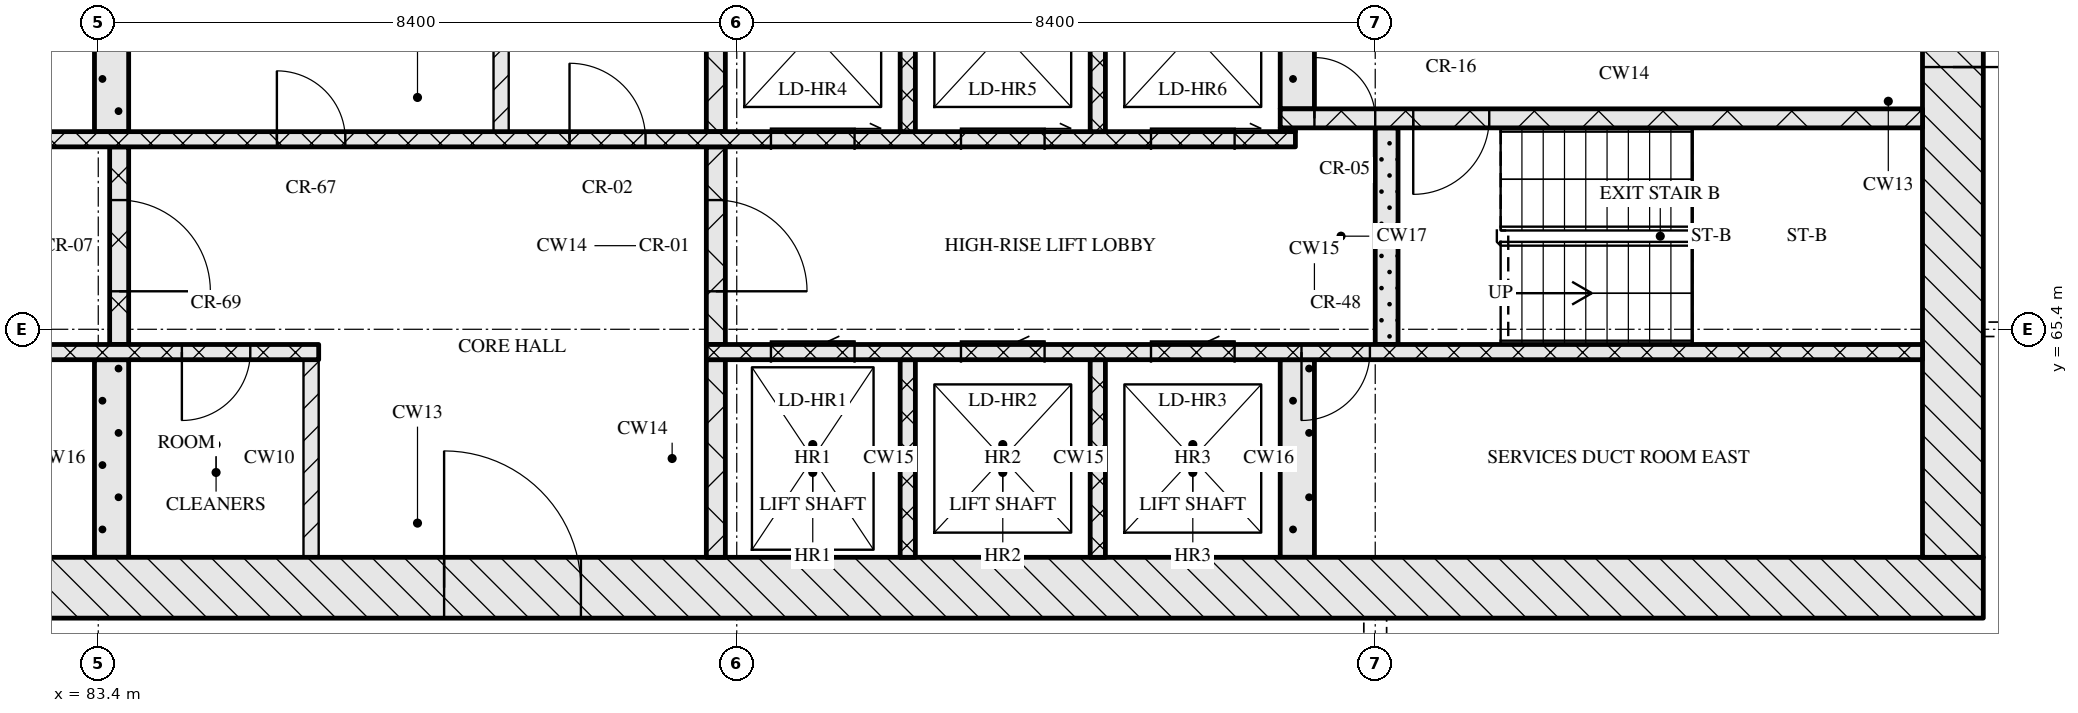
"""IFC4 building model, lengths in metres.
Left out: names, types, materials, properties, quantities, classifications, styles, units other than length and angle.
Written with IfcOpenShell. Run it as: python <this file> out.ifc"""

import sys

from ifc_helpers import new_model, si_unit, direction, frame, frame_2d, origin, place, context, subcontext, project, spatial, rectangle, extrude, element, fill, save


model = new_model("IFC4")
c1 = context("Model", 3, precision=1e-05, world=origin(), true_north=direction((0.0, 1.0)))
c2 = subcontext(c1, "Body", "Model", "MODEL_VIEW")
j1 = project(units=[si_unit("LENGTHUNIT", "METRE"), si_unit("PLANEANGLEUNIT", "RADIAN")], contexts=[c1])
p1 = place(None, origin())
s1 = spatial("IfcSite", under=j1, at=p1, CompositionType="ELEMENT")
p2 = place(p1, origin())
s2 = spatial("IfcBuilding", under=s1, at=p2, CompositionType="ELEMENT")
p3 = place(p2, frame((0.0, 0.0, 165.45)))
s3 = spatial("IfcBuildingStorey", under=s2, at=p3, CompositionType="ELEMENT", Elevation=165.45)
p4 = place(p3, frame((67.0, 62.0, 0.0), z_axis=(0.0, 0.0, 1.0), x_axis=(1.0, 0.0, 0.0)))
e1 = element("IfcWall", 1, at=p4, inside=s3, PredefinedType="SOLIDWALL", context=c2, shape_type="SweptSolid", body=[
    extrude(rectangle(XDim=41.2, YDim=0.8, at=frame_2d((20.6, 0.0))), origin(), (0.0, 0.0, 1.0), 3.32),
])
p5 = place(p4, frame((20.95, 0.0, 0.0)))
e2 = element("IfcOpeningElement", 2, at=p5, cuts=e1, PredefinedType="OPENING", context=c2, shape_type="SweptSolid", body=[
    extrude(rectangle(XDim=1.8, YDim=2.1, at=frame_2d((0.9, 1.05))), frame((0.0, 0.41, 0.0), z_axis=(0.0, -1.0, 0.0), x_axis=(1.0, 0.0, 0.0)), (0.0, 0.0, 1.0), 0.82),
])
p6 = place(p3, frame((107.8, 62.4, 0.0), z_axis=(0.0, 0.0, 1.0), x_axis=(0.0, 1.0, 0.0)))
e3 = element("IfcWall", 3, at=p6, inside=s3, PredefinedType="SOLIDWALL", context=c2, shape_type="SweptSolid", body=[
    extrude(rectangle(XDim=12.0, YDim=0.8, at=frame_2d((6.0, 0.0))), origin(), (0.0, 0.0, 1.0), 3.32),
])
p7 = place(p6, frame((6.45, 0.0, 0.0)))
e4 = element("IfcOpeningElement", 4, at=p7, cuts=e3, PredefinedType="OPENING", context=c2, shape_type="SweptSolid", body=[
    extrude(rectangle(XDim=1.2, YDim=2.1, at=frame_2d((0.6, 1.05))), frame((0.0, 0.41, 0.0), z_axis=(0.0, -1.0, 0.0), x_axis=(1.0, 0.0, 0.0)), (0.0, 0.0, 1.0), 0.82),
])
p8 = place(p3, frame((83.575, 62.4, 0.0), z_axis=(0.0, 0.0, 1.0), x_axis=(0.0, 1.0, 0.0)))
e5 = element("IfcWall", 5, at=p8, inside=s3, PredefinedType="SOLIDWALL", context=c2, shape_type="SweptSolid", body=[
    extrude(rectangle(XDim=2.6, YDim=0.45, at=frame_2d((1.3, 0.0))), origin(), (0.0, 0.0, 1.0), 3.32),
])
p9 = place(p3, frame((86.2, 62.4, 0.0), z_axis=(0.0, 0.0, 1.0), x_axis=(0.0, 1.0, 0.0)))
e6 = element("IfcWall", 6, at=p9, inside=s3, PredefinedType="PARTITIONING", context=c2, shape_type="SweptSolid", body=[
    extrude(rectangle(XDim=2.6, YDim=0.2, at=frame_2d((1.3, 0.0))), origin(), (0.0, 0.0, 1.0), 3.32),
])
p10 = place(p3, frame((91.525, 62.4, 0.0), z_axis=(0.0, 0.0, 1.0), x_axis=(0.0, 1.0, 0.0)))
e7 = element("IfcWall", 7, at=p10, inside=s3, PredefinedType="SOLIDWALL", context=c2, shape_type="SweptSolid", body=[
    extrude(rectangle(XDim=2.6, YDim=0.25, at=frame_2d((1.3, 0.0))), origin(), (0.0, 0.0, 1.0), 3.32),
])
for number, where, z_axis, x_axis in (
    (8, (94.05, 62.4, 0.0), (0.0, 0.0, 1.0), (0.0, 1.0, 0.0)),
    (9, (96.55, 62.4, 0.0), (0.0, 0.0, 1.0), (0.0, 1.0, 0.0)),
):
    element("IfcWall", number, at=place(p3, frame(where, z_axis=z_axis, x_axis=x_axis)), inside=s3, PredefinedType="SOLIDWALL", context=c2, shape_type="SweptSolid", body=[
        extrude(rectangle(XDim=2.6, YDim=0.2, at=frame_2d((1.3, 0.0))), origin(), (0.0, 0.0, 1.0), 3.32),
    ])
p11 = place(p3, frame((99.175, 62.4, 0.0), z_axis=(0.0, 0.0, 1.0), x_axis=(0.0, 1.0, 0.0)))
e10 = element("IfcWall", 10, at=p11, inside=s3, PredefinedType="SOLIDWALL", context=c2, shape_type="SweptSolid", body=[
    extrude(rectangle(XDim=2.6, YDim=0.45, at=frame_2d((1.3, 0.0))), origin(), (0.0, 0.0, 1.0), 3.32),
])
p12 = place(p3, frame((67.8, 65.1, 0.0), z_axis=(0.0, 0.0, 1.0), x_axis=(1.0, 0.0, 0.0)))
e11 = element("IfcWall", 11, at=p12, inside=s3, PredefinedType="SOLIDWALL", context=c2, shape_type="SweptSolid", body=[
    extrude(rectangle(XDim=18.5, YDim=0.2, at=frame_2d((9.25, 0.0))), origin(), (0.0, 0.0, 1.0), 3.32),
])
p13 = place(p12, frame((7.27, 0.0, 0.0)))
e12 = element("IfcOpeningElement", 12, at=p13, cuts=e11, PredefinedType="OPENING", context=c2, shape_type="SweptSolid", body=[
    extrude(rectangle(XDim=0.9, YDim=2.1, at=frame_2d((0.45, 1.05))), frame((0.0, 0.11, 0.0), z_axis=(0.0, -1.0, 0.0), x_axis=(1.0, 0.0, 0.0)), (0.0, 0.0, 1.0), 0.22),
])
p14 = place(p12, frame((10.1, 0.0, 0.0)))
e13 = element("IfcOpeningElement", 13, at=p14, cuts=e11, PredefinedType="OPENING", context=c2, shape_type="SweptSolid", body=[
    extrude(rectangle(XDim=0.9, YDim=2.1, at=frame_2d((0.45, 1.05))), frame((0.0, 0.11, 0.0), z_axis=(0.0, -1.0, 0.0), x_axis=(1.0, 0.0, 0.0)), (0.0, 0.0, 1.0), 0.22),
])
p15 = place(p12, frame((13.81, 0.0, 0.0)))
e14 = element("IfcOpeningElement", 14, at=p15, cuts=e11, PredefinedType="OPENING", context=c2, shape_type="SweptSolid", body=[
    extrude(rectangle(XDim=0.9, YDim=2.1, at=frame_2d((0.45, 1.05))), frame((0.0, 0.11, 0.0), z_axis=(0.0, -1.0, 0.0), x_axis=(1.0, 0.0, 0.0)), (0.0, 0.0, 1.0), 0.22),
])
p16 = place(p12, frame((16.7, 0.0, 0.0)))
e15 = element("IfcOpeningElement", 15, at=p16, cuts=e11, PredefinedType="OPENING", context=c2, shape_type="SweptSolid", body=[
    extrude(rectangle(XDim=0.9, YDim=2.1, at=frame_2d((0.45, 1.05))), frame((0.0, 0.11, 0.0), z_axis=(0.0, -1.0, 0.0), x_axis=(1.0, 0.0, 0.0)), (0.0, 0.0, 1.0), 0.22),
])
p17 = place(p3, frame((91.4, 65.1, 0.0), z_axis=(0.0, 0.0, 1.0), x_axis=(1.0, 0.0, 0.0)))
e16 = element("IfcWall", 16, at=p17, inside=s3, PredefinedType="SOLIDWALL", context=c2, shape_type="SweptSolid", body=[
    extrude(rectangle(XDim=16.0, YDim=0.2, at=frame_2d((8.0, 0.0))), origin(), (0.0, 0.0, 1.0), 3.32),
])
p18 = place(p17, frame((0.85, 0.0, 0.0)))
e17 = element("IfcOpeningElement", 17, at=p18, cuts=e16, PredefinedType="OPENING", context=c2, shape_type="SweptSolid", body=[
    extrude(rectangle(XDim=1.1, YDim=2.1, at=frame_2d((0.55, 1.05))), frame((0.0, 0.11, 0.0), z_axis=(0.0, -1.0, 0.0), x_axis=(1.0, 0.0, 0.0)), (0.0, 0.0, 1.0), 0.22),
])
p19 = place(p17, frame((3.35, 0.0, 0.0)))
e18 = element("IfcOpeningElement", 18, at=p19, cuts=e16, PredefinedType="OPENING", context=c2, shape_type="SweptSolid", body=[
    extrude(rectangle(XDim=1.1, YDim=2.1, at=frame_2d((0.55, 1.05))), frame((0.0, 0.11, 0.0), z_axis=(0.0, -1.0, 0.0), x_axis=(1.0, 0.0, 0.0)), (0.0, 0.0, 1.0), 0.22),
])
p20 = place(p17, frame((5.85, 0.0, 0.0)))
e19 = element("IfcOpeningElement", 19, at=p20, cuts=e16, PredefinedType="OPENING", context=c2, shape_type="SweptSolid", body=[
    extrude(rectangle(XDim=1.1, YDim=2.1, at=frame_2d((0.55, 1.05))), frame((0.0, 0.11, 0.0), z_axis=(0.0, -1.0, 0.0), x_axis=(1.0, 0.0, 0.0)), (0.0, 0.0, 1.0), 0.22),
])
p21 = place(p17, frame((7.83, 0.0, 0.0)))
e20 = element("IfcOpeningElement", 20, at=p21, cuts=e16, PredefinedType="OPENING", context=c2, shape_type="SweptSolid", body=[
    extrude(rectangle(XDim=0.9, YDim=2.1, at=frame_2d((0.45, 1.05))), frame((0.0, 0.11, 0.0), z_axis=(0.0, -1.0, 0.0), x_axis=(1.0, 0.0, 0.0)), (0.0, 0.0, 1.0), 0.22),
])
p22 = place(p3, frame((83.675, 65.2, 0.0), z_axis=(0.0, 0.0, 1.0), x_axis=(0.0, 1.0, 0.0)))
e21 = element("IfcWall", 21, at=p22, inside=s3, PredefinedType="SOLIDWALL", context=c2, shape_type="SweptSolid", body=[
    extrude(rectangle(XDim=2.6, YDim=0.25, at=frame_2d((1.3, 0.0))), origin(), (0.0, 0.0, 1.0), 3.32),
])
p23 = place(p22, frame((0.7, 0.0, 0.0)))
e22 = element("IfcOpeningElement", 22, at=p23, cuts=e21, PredefinedType="OPENING", context=c2, shape_type="SweptSolid", body=[
    extrude(rectangle(XDim=1.2, YDim=2.1, at=frame_2d((0.6, 1.05))), frame((0.0, 0.135, 0.0), z_axis=(0.0, -1.0, 0.0), x_axis=(1.0, 0.0, 0.0)), (0.0, 0.0, 1.0), 0.27),
])
p24 = place(p3, frame((91.525, 65.2, 0.0), z_axis=(0.0, 0.0, 1.0), x_axis=(0.0, 1.0, 0.0)))
e23 = element("IfcWall", 23, at=p24, inside=s3, PredefinedType="SOLIDWALL", context=c2, shape_type="SweptSolid", body=[
    extrude(rectangle(XDim=2.6, YDim=0.25, at=frame_2d((1.3, 0.0))), origin(), (0.0, 0.0, 1.0), 3.32),
])
p25 = place(p24, frame((0.7, 0.0, 0.0)))
e24 = element("IfcOpeningElement", 24, at=p25, cuts=e23, PredefinedType="OPENING", context=c2, shape_type="SweptSolid", body=[
    extrude(rectangle(XDim=1.2, YDim=2.1, at=frame_2d((0.6, 1.05))), frame((0.0, 0.135, 0.0), z_axis=(0.0, -1.0, 0.0), x_axis=(1.0, 0.0, 0.0)), (0.0, 0.0, 1.0), 0.27),
])
p26 = place(p3, frame((100.35, 65.2, 0.0), z_axis=(0.0, 0.0, 1.0), x_axis=(0.0, 1.0, 0.0)))
e25 = element("IfcWall", 25, at=p26, inside=s3, PredefinedType="SOLIDWALL", context=c2, shape_type="SweptSolid", body=[
    extrude(rectangle(XDim=2.85, YDim=0.3, at=frame_2d((1.425, 0.0))), origin(), (0.0, 0.0, 1.0), 3.32),
])
p27 = place(p3, frame((76.05, 67.9, 0.0), z_axis=(0.0, 0.0, 1.0), x_axis=(1.0, 0.0, 0.0)))
e26 = element("IfcWall", 26, at=p27, inside=s3, PredefinedType="SOLIDWALL", context=c2, shape_type="SweptSolid", body=[
    extrude(rectangle(XDim=23.1, YDim=0.2, at=frame_2d((11.55, 0.0))), origin(), (0.0, 0.0, 1.0), 3.32),
])
p28 = place(p27, frame((3.2, 0.0, 0.0)))
e27 = element("IfcOpeningElement", 27, at=p28, cuts=e26, PredefinedType="OPENING", context=c2, shape_type="SweptSolid", body=[
    extrude(rectangle(XDim=0.9, YDim=2.1, at=frame_2d((0.45, 1.05))), frame((0.0, 0.11, 0.0), z_axis=(0.0, -1.0, 0.0), x_axis=(1.0, 0.0, 0.0)), (0.0, 0.0, 1.0), 0.22),
])
p29 = place(p27, frame((9.7, 0.0, 0.0)))
e28 = element("IfcOpeningElement", 28, at=p29, cuts=e26, PredefinedType="OPENING", context=c2, shape_type="SweptSolid", body=[
    extrude(rectangle(XDim=0.9, YDim=2.1, at=frame_2d((0.45, 1.05))), frame((0.0, 0.11, 0.0), z_axis=(0.0, -1.0, 0.0), x_axis=(1.0, 0.0, 0.0)), (0.0, 0.0, 1.0), 0.22),
])
p30 = place(p27, frame((13.55, 0.0, 0.0)))
e29 = element("IfcOpeningElement", 29, at=p30, cuts=e26, PredefinedType="OPENING", context=c2, shape_type="SweptSolid", body=[
    extrude(rectangle(XDim=1.0, YDim=2.1, at=frame_2d((0.5, 1.05))), frame((0.0, 0.11, 0.0), z_axis=(0.0, -1.0, 0.0), x_axis=(1.0, 0.0, 0.0)), (0.0, 0.0, 1.0), 0.22),
])
p31 = place(p27, frame((16.2, 0.0, 0.0)))
e30 = element("IfcOpeningElement", 30, at=p31, cuts=e26, PredefinedType="OPENING", context=c2, shape_type="SweptSolid", body=[
    extrude(rectangle(XDim=1.1, YDim=2.1, at=frame_2d((0.55, 1.05))), frame((0.0, 0.11, 0.0), z_axis=(0.0, -1.0, 0.0), x_axis=(1.0, 0.0, 0.0)), (0.0, 0.0, 1.0), 0.22),
])
p32 = place(p27, frame((18.7, 0.0, 0.0)))
e31 = element("IfcOpeningElement", 31, at=p32, cuts=e26, PredefinedType="OPENING", context=c2, shape_type="SweptSolid", body=[
    extrude(rectangle(XDim=1.1, YDim=2.1, at=frame_2d((0.55, 1.05))), frame((0.0, 0.11, 0.0), z_axis=(0.0, -1.0, 0.0), x_axis=(1.0, 0.0, 0.0)), (0.0, 0.0, 1.0), 0.22),
])
p33 = place(p27, frame((21.2, 0.0, 0.0)))
e32 = element("IfcOpeningElement", 32, at=p33, cuts=e26, PredefinedType="OPENING", context=c2, shape_type="SweptSolid", body=[
    extrude(rectangle(XDim=1.1, YDim=2.1, at=frame_2d((0.55, 1.05))), frame((0.0, 0.11, 0.0), z_axis=(0.0, -1.0, 0.0), x_axis=(1.0, 0.0, 0.0)), (0.0, 0.0, 1.0), 0.22),
])
p34 = place(p3, frame((83.575, 68.0, 0.0), z_axis=(0.0, 0.0, 1.0), x_axis=(0.0, 1.0, 0.0)))
e33 = element("IfcWall", 33, at=p34, inside=s3, PredefinedType="SOLIDWALL", context=c2, shape_type="SweptSolid", body=[
    extrude(rectangle(XDim=2.6, YDim=0.45, at=frame_2d((1.3, 0.0))), origin(), (0.0, 0.0, 1.0), 3.32),
])
p35 = place(p3, frame((88.7, 68.0, 0.0), z_axis=(0.0, 0.0, 1.0), x_axis=(0.0, 1.0, 0.0)))
e34 = element("IfcWall", 34, at=p35, inside=s3, PredefinedType="PARTITIONING", context=c2, shape_type="SweptSolid", body=[
    extrude(rectangle(XDim=2.6, YDim=0.2, at=frame_2d((1.3, 0.0))), origin(), (0.0, 0.0, 1.0), 3.32),
])
p36 = place(p3, frame((91.525, 68.0, 0.0), z_axis=(0.0, 0.0, 1.0), x_axis=(0.0, 1.0, 0.0)))
e35 = element("IfcWall", 35, at=p36, inside=s3, PredefinedType="SOLIDWALL", context=c2, shape_type="SweptSolid", body=[
    extrude(rectangle(XDim=2.6, YDim=0.25, at=frame_2d((1.3, 0.0))), origin(), (0.0, 0.0, 1.0), 3.32),
])
for number, where, z_axis, x_axis in (
    (36, (94.05, 68.0, 0.0), (0.0, 0.0, 1.0), (0.0, 1.0, 0.0)),
    (37, (96.55, 68.0, 0.0), (0.0, 0.0, 1.0), (0.0, 1.0, 0.0)),
):
    element("IfcWall", number, at=place(p3, frame(where, z_axis=z_axis, x_axis=x_axis)), inside=s3, PredefinedType="SOLIDWALL", context=c2, shape_type="SweptSolid", body=[
        extrude(rectangle(XDim=2.6, YDim=0.2, at=frame_2d((1.3, 0.0))), origin(), (0.0, 0.0, 1.0), 3.32),
    ])
p37 = place(p3, frame((98.95, 68.025, 0.0), z_axis=(0.0, 0.0, 1.0), x_axis=(1.0, 0.0, 0.0)))
e38 = element("IfcWall", 38, at=p37, inside=s3, PredefinedType="SOLIDWALL", context=c2, shape_type="SweptSolid", body=[
    extrude(rectangle(XDim=0.2, YDim=0.05, at=frame_2d((0.1, 0.0))), origin(), (0.0, 0.0, 1.0), 3.32),
])
p38 = place(p3, frame((98.95, 68.175, 0.0), z_axis=(0.0, 0.0, 1.0), x_axis=(1.0, 0.0, 0.0)))
e39 = element("IfcWall", 39, at=p38, inside=s3, PredefinedType="SOLIDWALL", context=c2, shape_type="SweptSolid", body=[
    extrude(rectangle(XDim=8.45, YDim=0.25, at=frame_2d((4.225, 0.0))), origin(), (0.0, 0.0, 1.0), 3.32),
])
p39 = place(p38, frame((0.45, 0.0, 0.0)))
e40 = element("IfcOpeningElement", 40, at=p39, cuts=e39, PredefinedType="OPENING", context=c2, shape_type="SweptSolid", body=[
    extrude(rectangle(XDim=0.8, YDim=2.1, at=frame_2d((0.4, 1.05))), frame((0.0, 0.135, 0.0), z_axis=(0.0, -1.0, 0.0), x_axis=(1.0, 0.0, 0.0)), (0.0, 0.0, 1.0), 0.27),
])
p40 = place(p38, frame((1.75, 0.0, 0.0)))
e41 = element("IfcOpeningElement", 41, at=p40, cuts=e39, PredefinedType="OPENING", context=c2, shape_type="SweptSolid", body=[
    extrude(rectangle(XDim=1.0, YDim=2.1, at=frame_2d((0.5, 1.05))), frame((0.0, 0.135, 0.0), z_axis=(0.0, -1.0, 0.0), x_axis=(1.0, 0.0, 0.0)), (0.0, 0.0, 1.0), 0.27),
])
p41 = place(p3, frame((99.175, 68.3, 0.0), z_axis=(0.0, 0.0, 1.0), x_axis=(0.0, 1.0, 0.0)))
e42 = element("IfcWall", 42, at=p41, inside=s3, PredefinedType="SOLIDWALL", context=c2, shape_type="SweptSolid", body=[
    extrude(rectangle(XDim=2.3, YDim=0.45, at=frame_2d((1.15, 0.0))), origin(), (0.0, 0.0, 1.0), 3.32),
])
p42 = place(p5, origin())
e43 = element("IfcDoor", 43, at=p42, inside=s3, OperationType="DOUBLE_DOOR_SINGLE_SWING", PredefinedType="DOOR", context=c2, shape_type="SweptSolid", body=[
    extrude(rectangle(XDim=1.8, YDim=2.1, at=frame_2d((0.9, 1.05))), frame((0.0, 0.025, 0.0), z_axis=(0.0, -1.0, 0.0), x_axis=(1.0, 0.0, 0.0)), (0.0, 0.0, 1.0), 0.05),
])
fill(e2, e43)
p43 = place(p16, origin())
e44 = element("IfcDoor", 44, at=p43, inside=s3, OperationType="SINGLE_SWING_RIGHT", PredefinedType="DOOR", context=c2, shape_type="SweptSolid", body=[
    extrude(rectangle(XDim=0.9, YDim=2.1, at=frame_2d((0.45, 1.05))), frame((0.0, 0.025, 0.0), z_axis=(0.0, -1.0, 0.0), x_axis=(1.0, 0.0, 0.0)), (0.0, 0.0, 1.0), 0.05),
])
fill(e15, e44)
p44 = place(p18, origin())
e45 = element("IfcDoor", 45, at=p44, inside=s3, OperationType="SLIDING_TO_LEFT", PredefinedType="DOOR", context=c2, shape_type="SweptSolid", body=[
    extrude(rectangle(XDim=1.1, YDim=2.1, at=frame_2d((0.55, 1.05))), frame((0.0, 0.025, 0.0), z_axis=(0.0, -1.0, 0.0), x_axis=(1.0, 0.0, 0.0)), (0.0, 0.0, 1.0), 0.05),
])
fill(e17, e45)
p45 = place(p19, origin())
e46 = element("IfcDoor", 46, at=p45, inside=s3, OperationType="SLIDING_TO_LEFT", PredefinedType="DOOR", context=c2, shape_type="SweptSolid", body=[
    extrude(rectangle(XDim=1.1, YDim=2.1, at=frame_2d((0.55, 1.05))), frame((0.0, 0.025, 0.0), z_axis=(0.0, -1.0, 0.0), x_axis=(1.0, 0.0, 0.0)), (0.0, 0.0, 1.0), 0.05),
])
fill(e18, e46)
p46 = place(p20, origin())
e47 = element("IfcDoor", 47, at=p46, inside=s3, OperationType="SLIDING_TO_LEFT", PredefinedType="DOOR", context=c2, shape_type="SweptSolid", body=[
    extrude(rectangle(XDim=1.1, YDim=2.1, at=frame_2d((0.55, 1.05))), frame((0.0, 0.025, 0.0), z_axis=(0.0, -1.0, 0.0), x_axis=(1.0, 0.0, 0.0)), (0.0, 0.0, 1.0), 0.05),
])
fill(e19, e47)
p47 = place(p21, origin())
e48 = element("IfcDoor", 48, at=p47, inside=s3, OperationType="SINGLE_SWING_RIGHT", PredefinedType="DOOR", context=c2, shape_type="SweptSolid", body=[
    extrude(rectangle(XDim=0.9, YDim=2.1, at=frame_2d((0.45, 1.05))), frame((0.0, 0.025, 0.0), z_axis=(0.0, -1.0, 0.0), x_axis=(1.0, 0.0, 0.0)), (0.0, 0.0, 1.0), 0.05),
])
fill(e20, e48)
p48 = place(p23, origin())
e49 = element("IfcDoor", 49, at=p48, inside=s3, OperationType="SINGLE_SWING_RIGHT", PredefinedType="DOOR", context=c2, shape_type="SweptSolid", body=[
    extrude(rectangle(XDim=1.2, YDim=2.1, at=frame_2d((0.6, 1.05))), frame((0.0, 0.025, 0.0), z_axis=(0.0, -1.0, 0.0), x_axis=(1.0, 0.0, 0.0)), (0.0, 0.0, 1.0), 0.05),
])
fill(e22, e49)
p49 = place(p25, origin())
e50 = element("IfcDoor", 50, at=p49, inside=s3, OperationType="SINGLE_SWING_RIGHT", PredefinedType="DOOR", context=c2, shape_type="SweptSolid", body=[
    extrude(rectangle(XDim=1.2, YDim=2.1, at=frame_2d((0.6, 1.05))), frame((0.0, 0.025, 0.0), z_axis=(0.0, -1.0, 0.0), x_axis=(1.0, 0.0, 0.0)), (0.0, 0.0, 1.0), 0.05),
])
fill(e24, e50)
p50 = place(p29, origin())
e51 = element("IfcDoor", 51, at=p50, inside=s3, OperationType="SINGLE_SWING_LEFT", PredefinedType="DOOR", context=c2, shape_type="SweptSolid", body=[
    extrude(rectangle(XDim=0.9, YDim=2.1, at=frame_2d((0.45, 1.05))), frame((0.0, 0.025, 0.0), z_axis=(0.0, -1.0, 0.0), x_axis=(1.0, 0.0, 0.0)), (0.0, 0.0, 1.0), 0.05),
])
fill(e28, e51)
p51 = place(p30, origin())
e52 = element("IfcDoor", 52, at=p51, inside=s3, OperationType="SINGLE_SWING_LEFT", PredefinedType="DOOR", context=c2, shape_type="SweptSolid", body=[
    extrude(rectangle(XDim=1.0, YDim=2.1, at=frame_2d((0.5, 1.05))), frame((0.0, 0.025, 0.0), z_axis=(0.0, -1.0, 0.0), x_axis=(1.0, 0.0, 0.0)), (0.0, 0.0, 1.0), 0.05),
])
fill(e29, e52)
p52 = place(p31, origin())
e53 = element("IfcDoor", 53, at=p52, inside=s3, OperationType="SLIDING_TO_RIGHT", PredefinedType="DOOR", context=c2, shape_type="SweptSolid", body=[
    extrude(rectangle(XDim=1.1, YDim=2.1, at=frame_2d((0.55, 1.05))), frame((0.0, 0.025, 0.0), z_axis=(0.0, -1.0, 0.0), x_axis=(1.0, 0.0, 0.0)), (0.0, 0.0, 1.0), 0.05),
])
fill(e30, e53)
p53 = place(p32, origin())
e54 = element("IfcDoor", 54, at=p53, inside=s3, OperationType="SLIDING_TO_RIGHT", PredefinedType="DOOR", context=c2, shape_type="SweptSolid", body=[
    extrude(rectangle(XDim=1.1, YDim=2.1, at=frame_2d((0.55, 1.05))), frame((0.0, 0.025, 0.0), z_axis=(0.0, -1.0, 0.0), x_axis=(1.0, 0.0, 0.0)), (0.0, 0.0, 1.0), 0.05),
])
fill(e31, e54)
p54 = place(p33, origin())
e55 = element("IfcDoor", 55, at=p54, inside=s3, OperationType="SLIDING_TO_RIGHT", PredefinedType="DOOR", context=c2, shape_type="SweptSolid", body=[
    extrude(rectangle(XDim=1.1, YDim=2.1, at=frame_2d((0.55, 1.05))), frame((0.0, 0.025, 0.0), z_axis=(0.0, -1.0, 0.0), x_axis=(1.0, 0.0, 0.0)), (0.0, 0.0, 1.0), 0.05),
])
fill(e32, e55)
p55 = place(p39, origin())
e56 = element("IfcDoor", 56, at=p55, inside=s3, OperationType="SINGLE_SWING_LEFT", PredefinedType="DOOR", context=c2, shape_type="SweptSolid", body=[
    extrude(rectangle(XDim=0.8, YDim=2.1, at=frame_2d((0.4, 1.05))), frame((0.0, 0.025, 0.0), z_axis=(0.0, -1.0, 0.0), x_axis=(1.0, 0.0, 0.0)), (0.0, 0.0, 1.0), 0.05),
])
fill(e40, e56)
p56 = place(p40, origin())
e57 = element("IfcDoor", 57, at=p56, inside=s3, OperationType="SINGLE_SWING_RIGHT", PredefinedType="DOOR", context=c2, shape_type="SweptSolid", body=[
    extrude(rectangle(XDim=1.0, YDim=2.1, at=frame_2d((0.5, 1.05))), frame((0.0, 0.025, 0.0), z_axis=(0.0, -1.0, 0.0), x_axis=(1.0, 0.0, 0.0)), (0.0, 0.0, 1.0), 0.05),
])
fill(e41, e57)
p57 = place(p7, origin())
e58 = element("IfcDoor", 58, at=p57, inside=s3, OperationType="SINGLE_SWING_RIGHT", PredefinedType="DOOR", context=c2, shape_type="SweptSolid", body=[
    extrude(rectangle(XDim=1.2, YDim=2.1, at=frame_2d((0.6, 1.05))), frame((0.0, 0.025, 0.0), z_axis=(0.0, -1.0, 0.0), x_axis=(1.0, 0.0, 0.0)), (0.0, 0.0, 1.0), 0.05),
])
fill(e4, e58)
save(model, sys.argv[1])
